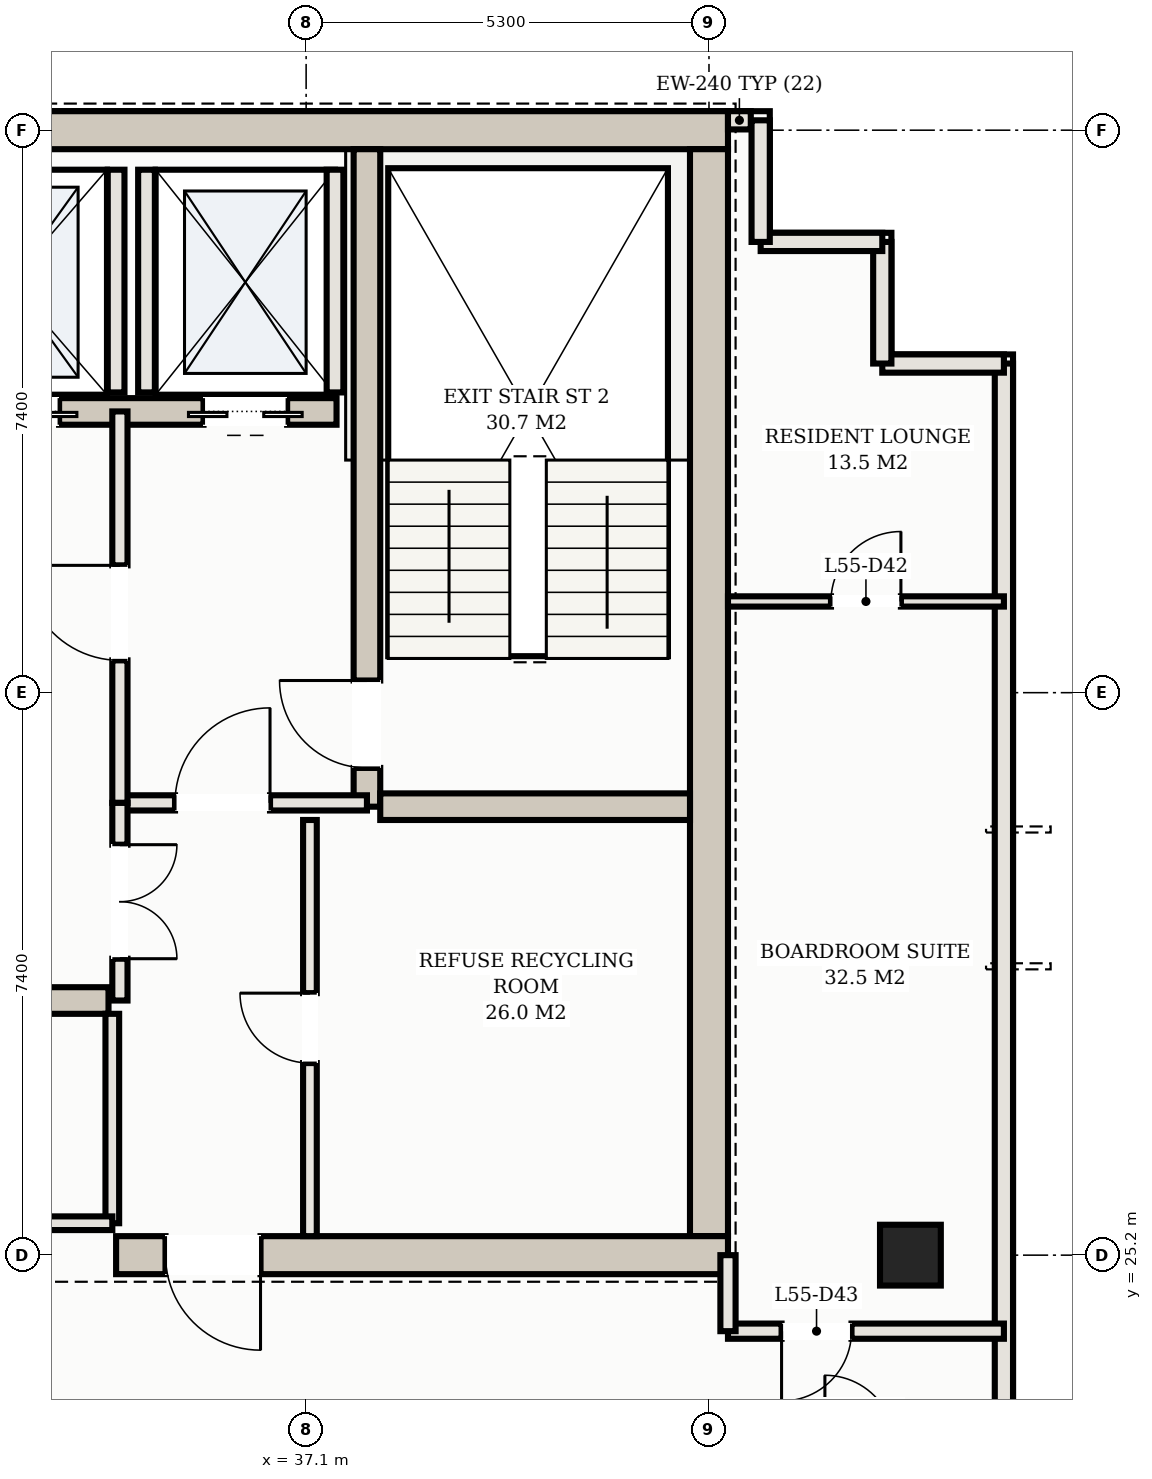
"""IFC4 building model, lengths in metres.
Left out: names, types, materials, properties, quantities, classifications, styles, units other than length and angle.
Written with IfcOpenShell. Run it as: python <this file> out.ifc"""

import sys

from ifc_helpers import new_model, si_unit, direction, frame, frame_2d, origin, origin_2d, place, context, subcontext, project, spatial, rectangle, hollow_rectangle, extrude, element, fill, save


model = new_model("IFC4")
c1 = context("Model", 3, precision=1e-05, world=origin(), true_north=direction((0.0, 1.0)))
c2 = subcontext(c1, "Body", "Model", "MODEL_VIEW")
j1 = project(units=[si_unit("LENGTHUNIT", "METRE"), si_unit("PLANEANGLEUNIT", "RADIAN")], contexts=[c1])
p1 = place(None, origin())
s1 = spatial("IfcSite", under=j1, at=p1, CompositionType="ELEMENT")
p2 = place(p1, origin())
s2 = spatial("IfcBuilding", under=s1, at=p2, CompositionType="ELEMENT")
p3 = place(p2, frame((0.0, 0.0, 203.3)))
s3 = spatial("IfcBuildingStorey", under=s2, at=p3, CompositionType="ELEMENT", Elevation=203.3)
p4 = place(p3, frame((10.35, 40.0, 0.0), z_axis=(0.0, 0.0, 1.0), x_axis=(1.0, 0.0, 0.0)))
e1 = element("IfcWall", 1, at=p4, inside=s3, PredefinedType="SHEAR", context=c2, shape_type="SweptSolid", body=[
    extrude(rectangle(XDim=32.3, YDim=0.5, at=frame_2d((16.15, 0.0))), origin(), (0.0, 0.0, 1.0), 3.11),
])
p5 = place(p3, frame((42.4, 25.45, 0.0), z_axis=(0.0, 0.0, 1.0), x_axis=(0.0, 1.0, 0.0)))
e2 = element("IfcWall", 2, at=p5, inside=s3, PredefinedType="SHEAR", context=c2, shape_type="SweptSolid", body=[
    extrude(rectangle(XDim=14.3, YDim=0.5, at=frame_2d((7.15, 0.0))), origin(), (0.0, 0.0, 1.0), 3.11),
])
p6 = place(p3, frame((34.6, 25.2, 0.0), z_axis=(0.0, 0.0, 1.0), x_axis=(1.0, 0.0, 0.0)))
e3 = element("IfcWall", 3, at=p6, inside=s3, PredefinedType="SHEAR", context=c2, shape_type="SweptSolid", body=[
    extrude(rectangle(XDim=8.05, YDim=0.5, at=frame_2d((4.025, 0.0))), origin(), (0.0, 0.0, 1.0), 3.11),
])
p7 = place(p6, frame((0.65, 0.0, 0.0)))
e4 = element("IfcOpeningElement", 4, at=p7, cuts=e3, PredefinedType="OPENING", context=c2, shape_type="SweptSolid", body=[
    extrude(rectangle(XDim=1.25, YDim=2.2, at=frame_2d((0.625, 1.1))), frame((0.0, 0.26, 0.0), z_axis=(0.0, -1.0, 0.0), x_axis=(1.0, 0.0, 0.0)), (0.0, 0.0, 1.0), 0.52),
])
p8 = place(p3, frame((37.9, 31.1, 0.0), z_axis=(0.0, 0.0, 1.0), x_axis=(0.0, 1.0, 0.0)))
e5 = element("IfcWall", 5, at=p8, inside=s3, PredefinedType="SHEAR", context=c2, shape_type="SweptSolid", body=[
    extrude(rectangle(XDim=8.65, YDim=0.35, at=frame_2d((4.325, 0.0))), origin(), (0.0, 0.0, 1.0), 3.11),
])
p9 = place(p8, frame((0.51, 0.0, 0.0)))
e6 = element("IfcOpeningElement", 6, at=p9, cuts=e5, PredefinedType="OPENING", context=c2, shape_type="SweptSolid", body=[
    extrude(rectangle(XDim=1.15, YDim=2.2, at=frame_2d((0.575, 1.1))), frame((0.0, 0.185, 0.0), z_axis=(0.0, -1.0, 0.0), x_axis=(1.0, 0.0, 0.0)), (0.0, 0.0, 1.0), 0.37),
])
p10 = place(p3, frame((38.075, 31.1, 0.0), z_axis=(0.0, 0.0, 1.0), x_axis=(1.0, 0.0, 0.0)))
e7 = element("IfcWall", 7, at=p10, inside=s3, PredefinedType="SHEAR", context=c2, shape_type="SweptSolid", body=[
    extrude(rectangle(XDim=4.075, YDim=0.35, at=frame_2d((2.038, 0.0))), origin(), (0.0, 0.0, 1.0), 3.11),
])
p11 = place(p3, frame((15.5, 36.3, 0.0), z_axis=(0.0, 0.0, 1.0), x_axis=(1.0, 0.0, 0.0)))
e8 = element("IfcWall", 8, at=p11, inside=s3, PredefinedType="SHEAR", context=c2, shape_type="SweptSolid", body=[
    extrude(rectangle(XDim=22.0, YDim=0.35, at=frame_2d((11.0, 0.0))), origin(), (0.0, 0.0, 1.0), 3.11),
])
p12 = place(p11, frame((0.65, 0.0, 0.0)))
e9 = element("IfcOpeningElement", 9, at=p12, cuts=e8, PredefinedType="OPENING", context=c2, shape_type="SweptSolid", body=[
    extrude(rectangle(XDim=1.1, YDim=2.15, at=frame_2d((0.55, 1.075))), frame((0.0, 0.185, 0.0), z_axis=(0.0, -1.0, 0.0), x_axis=(1.0, 0.0, 0.0)), (0.0, 0.0, 1.0), 0.37),
])
p13 = place(p11, frame((20.25, 0.0, 0.0)))
e10 = element("IfcOpeningElement", 10, at=p13, cuts=e8, PredefinedType="OPENING", context=c2, shape_type="SweptSolid", body=[
    extrude(rectangle(XDim=1.1, YDim=2.15, at=frame_2d((0.55, 1.075))), frame((0.0, 0.185, 0.0), z_axis=(0.0, -1.0, 0.0), x_axis=(1.0, 0.0, 0.0)), (0.0, 0.0, 1.0), 0.37),
])
p14 = place(p11, frame((17.05, 0.0, 0.0)))
e11 = element("IfcOpeningElement", 11, at=p14, cuts=e8, PredefinedType="OPENING", context=c2, shape_type="SweptSolid", body=[
    extrude(rectangle(XDim=1.3, YDim=2.2, at=frame_2d((0.65, 1.1))), frame((0.0, 0.185, 0.0), z_axis=(0.0, -1.0, 0.0), x_axis=(1.0, 0.0, 0.0)), (0.0, 0.0, 1.0), 0.37),
])
p15 = place(p11, frame((3.95, 0.0, 0.0)))
e12 = element("IfcOpeningElement", 12, at=p15, cuts=e8, PredefinedType="OPENING", context=c2, shape_type="SweptSolid", body=[
    extrude(rectangle(XDim=1.1, YDim=2.15, at=frame_2d((0.55, 1.075))), frame((0.0, 0.185, 0.0), z_axis=(0.0, -1.0, 0.0), x_axis=(1.0, 0.0, 0.0)), (0.0, 0.0, 1.0), 0.37),
])
p16 = place(p11, frame((6.55, 0.0, 0.0)))
e13 = element("IfcOpeningElement", 13, at=p16, cuts=e8, PredefinedType="OPENING", context=c2, shape_type="SweptSolid", body=[
    extrude(rectangle(XDim=1.1, YDim=2.15, at=frame_2d((0.55, 1.075))), frame((0.0, 0.185, 0.0), z_axis=(0.0, -1.0, 0.0), x_axis=(1.0, 0.0, 0.0)), (0.0, 0.0, 1.0), 0.37),
])
p17 = place(p11, frame((9.15, 0.0, 0.0)))
e14 = element("IfcOpeningElement", 14, at=p17, cuts=e8, PredefinedType="OPENING", context=c2, shape_type="SweptSolid", body=[
    extrude(rectangle(XDim=1.1, YDim=2.15, at=frame_2d((0.55, 1.075))), frame((0.0, 0.185, 0.0), z_axis=(0.0, -1.0, 0.0), x_axis=(1.0, 0.0, 0.0)), (0.0, 0.0, 1.0), 0.37),
])
p18 = place(p3, frame((18.5, 28.55, 0.0), z_axis=(0.0, 0.0, 1.0), x_axis=(1.0, 0.0, 0.0)))
e15 = element("IfcWall", 15, at=p18, inside=s3, PredefinedType="SHEAR", context=c2, shape_type="SweptSolid", body=[
    extrude(rectangle(XDim=16.0, YDim=0.35, at=frame_2d((8.0, 0.0))), origin(), (0.0, 0.0, 1.0), 3.11),
])
p19 = place(p3, frame((45.05, 25.2, 0.0), z_axis=(0.0, 0.0, 1.0), x_axis=(1.0, 0.0, 0.0)))
e16 = element("IfcColumn", 16, at=p19, inside=s3, PredefinedType="COLUMN", context=c2, shape_type="SweptSolid", body=[
    extrude(hollow_rectangle(XDim=0.8, YDim=0.8, WallThickness=0.028, at=origin_2d()), origin(), (0.0, 0.0, 1.0), 3.3),
])
for number, where, z_axis, x_axis in (
    (17, (35.0, 36.55, 0.0), (0.0, 0.0, 1.0), (0.0, 1.0, 0.0)),
    (18, (37.48, 36.55, 0.0), (0.0, 0.0, 1.0), (0.0, 1.0, 0.0)),
    (19, (34.6, 36.55, 0.0), (0.0, 0.0, 1.0), (0.0, 1.0, 0.0)),
):
    element("IfcWall", number, at=place(p3, frame(where, z_axis=z_axis, x_axis=x_axis)), inside=s3, PredefinedType="SOLIDWALL", context=c2, shape_type="SweptSolid", body=[
        extrude(rectangle(XDim=2.93, YDim=0.22, at=frame_2d((1.465, 0.0))), origin(), (0.0, 0.0, 1.0), 3.11),
    ])
p20 = place(p3, frame((46.28, 10.52, 0.0), z_axis=(0.0, 0.0, 1.0), x_axis=(0.0, 1.0, 0.0)))
e20 = element("IfcWall", 20, at=p20, inside=s3, PredefinedType="SOLIDWALL", context=c2, shape_type="SweptSolid", body=[
    extrude(rectangle(XDim=26.41, YDim=0.24, at=frame_2d((13.205, 0.0))), origin(), (0.0, 0.0, 1.0), 3.11),
])
p21 = place(p20, frame((6.48, 0.0, 0.0)))
e21 = element("IfcOpeningElement", 21, at=p21, cuts=e20, PredefinedType="OPENING", context=c2, shape_type="SweptSolid", body=[
    extrude(rectangle(XDim=1.8, YDim=2.2, at=frame_2d((0.9, 1.1))), frame((0.0, 0.13, 0.0), z_axis=(0.0, -1.0, 0.0), x_axis=(1.0, 0.0, 0.0)), (0.0, 0.0, 1.0), 0.26),
])
for number, where, z_axis, x_axis in (
    (22, (46.28, 36.93, 0.0), (0.0, 0.0, 1.0), (-1.0, 0.0, 0.0)),
    (23, (44.68, 36.93, 0.0), (0.0, 0.0, 1.0), (0.0, 1.0, 0.0)),
):
    element("IfcWall", number, at=place(p3, frame(where, z_axis=z_axis, x_axis=x_axis)), inside=s3, PredefinedType="SOLIDWALL", context=c2, shape_type="SweptSolid", body=[
        extrude(rectangle(XDim=1.6, YDim=0.24, at=frame_2d((0.8, 0.0))), origin(), (0.0, 0.0, 1.0), 3.11),
    ])
for number, where, z_axis, x_axis in (
    (24, (44.68, 38.53, 0.0), (0.0, 0.0, 1.0), (-1.0, 0.0, 0.0)),
    (25, (43.08, 38.53, 0.0), (0.0, 0.0, 1.0), (0.0, 1.0, 0.0)),
):
    element("IfcWall", number, at=place(p3, frame(where, z_axis=z_axis, x_axis=x_axis)), inside=s3, PredefinedType="SOLIDWALL", context=c2, shape_type="SweptSolid", body=[
        extrude(rectangle(XDim=1.6, YDim=0.24, at=frame_2d((0.8, 0.0))), origin(), (0.0, 0.0, 1.0), 3.11),
    ])
p22 = place(p3, frame((42.95, 40.13, 0.0), z_axis=(0.0, 0.0, 1.0), x_axis=(-1.0, 0.0, 0.0)))
e26 = element("IfcWall", 26, at=p22, inside=s3, PredefinedType="SOLIDWALL", context=c2, shape_type="SweptSolid", body=[
    extrude(rectangle(XDim=0.3, YDim=0.24, at=frame_2d((0.15, 0.0))), origin(), (0.0, 0.0, 1.0), 3.11),
])
p23 = place(p3, frame((34.65, 31.15, 0.0), z_axis=(0.0, 0.0, 1.0), x_axis=(1.0, 0.0, 0.0)))
e27 = element("IfcWall", 27, at=p23, inside=s3, PredefinedType="PARTITIONING", context=c2, shape_type="SweptSolid", body=[
    extrude(rectangle(XDim=3.25, YDim=0.2, at=frame_2d((1.625, 0.0))), origin(), (0.0, 0.0, 1.0), 2.43),
])
p24 = place(p23, frame((0.725, 0.0, 0.0)))
e28 = element("IfcOpeningElement", 28, at=p24, cuts=e27, PredefinedType="OPENING", context=c2, shape_type="SweptSolid", body=[
    extrude(rectangle(XDim=1.25, YDim=2.2, at=frame_2d((0.625, 1.1))), frame((0.0, 0.11, 0.0), z_axis=(0.0, -1.0, 0.0), x_axis=(1.0, 0.0, 0.0)), (0.0, 0.0, 1.0), 0.22),
])
p25 = place(p3, frame((34.65, 31.15, 0.0), z_axis=(0.0, 0.0, 1.0), x_axis=(0.0, 1.0, 0.0)))
e29 = element("IfcWall", 29, at=p25, inside=s3, PredefinedType="PARTITIONING", context=c2, shape_type="SweptSolid", body=[
    extrude(rectangle(XDim=5.15, YDim=0.2, at=frame_2d((2.575, 0.0))), origin(), (0.0, 0.0, 1.0), 2.43),
])
p26 = place(p25, frame((1.875, 0.0, 0.0)))
e30 = element("IfcOpeningElement", 30, at=p26, cuts=e29, PredefinedType="OPENING", context=c2, shape_type="SweptSolid", body=[
    extrude(rectangle(XDim=1.25, YDim=2.2, at=frame_2d((0.625, 1.1))), frame((0.0, 0.11, 0.0), z_axis=(0.0, -1.0, 0.0), x_axis=(1.0, 0.0, 0.0)), (0.0, 0.0, 1.0), 0.22),
])
p27 = place(p3, frame((37.15, 25.45, 0.0), z_axis=(0.0, 0.0, 1.0), x_axis=(0.0, 1.0, 0.0)))
e31 = element("IfcWall", 31, at=p27, inside=s3, PredefinedType="PARTITIONING", context=c2, shape_type="SweptSolid", body=[
    extrude(rectangle(XDim=5.475, YDim=0.18, at=frame_2d((2.738, 0.0))), origin(), (0.0, 0.0, 1.0), 2.43),
])
p28 = place(p27, frame((2.277, 0.0, 0.0)))
e32 = element("IfcOpeningElement", 32, at=p28, cuts=e31, PredefinedType="OPENING", context=c2, shape_type="SweptSolid", body=[
    extrude(rectangle(XDim=0.92, YDim=2.15, at=frame_2d((0.46, 1.075))), frame((0.0, 0.1, 0.0), z_axis=(0.0, -1.0, 0.0), x_axis=(1.0, 0.0, 0.0)), (0.0, 0.0, 1.0), 0.2),
])
p29 = place(p3, frame((34.65, 28.55, 0.0), z_axis=(0.0, 0.0, 1.0), x_axis=(0.0, 1.0, 0.0)))
e33 = element("IfcWall", 33, at=p29, inside=s3, PredefinedType="PARTITIONING", context=c2, shape_type="SweptSolid", body=[
    extrude(rectangle(XDim=2.6, YDim=0.2, at=frame_2d((1.3, 0.0))), origin(), (0.0, 0.0, 1.0), 2.43),
])
p30 = place(p29, frame((0.55, 0.0, 0.0)))
e34 = element("IfcOpeningElement", 34, at=p30, cuts=e33, PredefinedType="OPENING", context=c2, shape_type="SweptSolid", body=[
    extrude(rectangle(XDim=1.5, YDim=2.25, at=frame_2d((0.75, 1.125))), frame((0.0, 0.11, 0.0), z_axis=(0.0, -1.0, 0.0), x_axis=(1.0, 0.0, 0.0)), (0.0, 0.0, 1.0), 0.22),
])
p31 = place(p3, frame((34.55, 25.62, 0.0), z_axis=(0.0, 0.0, 1.0), x_axis=(0.0, 1.0, 0.0)))
e35 = element("IfcWall", 35, at=p31, inside=s3, PredefinedType="PARTITIONING", context=c2, shape_type="SweptSolid", body=[
    extrude(rectangle(XDim=2.755, YDim=0.18, at=frame_2d((1.377, 0.0))), origin(), (0.0, 0.0, 1.0), 2.43),
])
p32 = place(p3, frame((26.65, 25.62, 0.0), z_axis=(0.0, 0.0, 1.0), x_axis=(1.0, 0.0, 0.0)))
e36 = element("IfcWall", 36, at=p32, inside=s3, PredefinedType="PARTITIONING", context=c2, shape_type="SweptSolid", body=[
    extrude(rectangle(XDim=7.9, YDim=0.18, at=frame_2d((3.95, 0.0))), origin(), (0.0, 0.0, 1.0), 2.43),
])
p33 = place(p32, frame((3.34, 0.0, 0.0)))
e37 = element("IfcOpeningElement", 37, at=p33, cuts=e36, PredefinedType="OPENING", context=c2, shape_type="SweptSolid", body=[
    extrude(rectangle(XDim=0.92, YDim=2.15, at=frame_2d((0.46, 1.075))), frame((0.0, 0.1, 0.0), z_axis=(0.0, -1.0, 0.0), x_axis=(1.0, 0.0, 0.0)), (0.0, 0.0, 1.0), 0.2),
])
p34 = place(p3, frame((42.65, 24.2, 0.0), z_axis=(0.0, 0.0, 1.0), x_axis=(1.0, 0.0, 0.0)))
e38 = element("IfcWall", 38, at=p34, inside=s3, PredefinedType="PARTITIONING", context=c2, shape_type="SweptSolid", body=[
    extrude(rectangle(XDim=3.63, YDim=0.2, at=frame_2d((1.815, 0.0))), origin(), (0.0, 0.0, 1.0), 2.43),
])
p35 = place(p34, frame((0.705, 0.0, 0.0)))
e39 = element("IfcOpeningElement", 39, at=p35, cuts=e38, PredefinedType="OPENING", context=c2, shape_type="SweptSolid", body=[
    extrude(rectangle(XDim=0.92, YDim=2.15, at=frame_2d((0.46, 1.075))), frame((0.0, 0.11, 0.0), z_axis=(0.0, -1.0, 0.0), x_axis=(1.0, 0.0, 0.0)), (0.0, 0.0, 1.0), 0.22),
])
p36 = place(p3, frame((42.65, 24.2, 0.0), z_axis=(0.0, 0.0, 1.0), x_axis=(0.0, 1.0, 0.0)))
e40 = element("IfcWall", 40, at=p36, inside=s3, PredefinedType="PARTITIONING", context=c2, shape_type="SweptSolid", body=[
    extrude(rectangle(XDim=1.0, YDim=0.2, at=frame_2d((0.5, 0.0))), origin(), (0.0, 0.0, 1.0), 2.43),
])
p37 = place(p3, frame((42.65, 33.8, 0.0), z_axis=(0.0, 0.0, 1.0), x_axis=(1.0, 0.0, 0.0)))
e41 = element("IfcWall", 41, at=p37, inside=s3, PredefinedType="PARTITIONING", context=c2, shape_type="SweptSolid", body=[
    extrude(rectangle(XDim=3.63, YDim=0.135, at=frame_2d((1.815, 0.0))), origin(), (0.0, 0.0, 1.0), 2.43),
])
p38 = place(p37, frame((1.355, 0.0, 0.0)))
e42 = element("IfcOpeningElement", 42, at=p38, cuts=e41, PredefinedType="OPENING", context=c2, shape_type="SweptSolid", body=[
    extrude(rectangle(XDim=0.92, YDim=2.15, at=frame_2d((0.46, 1.075))), frame((0.0, 0.078, 0.0), z_axis=(0.0, -1.0, 0.0), x_axis=(1.0, 0.0, 0.0)), (0.0, 0.0, 1.0), 0.155),
])
p39 = place(p13, frame((1.1, 0.0, 0.0), z_axis=(0.0, 0.0, 1.0), x_axis=(-1.0, 0.0, 0.0)))
e43 = element("IfcDoor", 43, at=p39, inside=s3, OperationType="DOUBLE_DOOR_SLIDING", PredefinedType="DOOR", context=c2, shape_type="SweptSolid", body=[
    extrude(rectangle(XDim=1.1, YDim=2.15, at=frame_2d((0.55, 1.075))), frame((0.0, 0.025, 0.0), z_axis=(0.0, -1.0, 0.0), x_axis=(1.0, 0.0, 0.0)), (0.0, 0.0, 1.0), 0.05),
])
fill(e10, e43)
p40 = place(p14, frame((1.3, 0.0, 0.0), z_axis=(0.0, 0.0, 1.0), x_axis=(-1.0, 0.0, 0.0)))
e44 = element("IfcDoor", 44, at=p40, inside=s3, OperationType="DOUBLE_DOOR_SLIDING", PredefinedType="DOOR", context=c2, shape_type="SweptSolid", body=[
    extrude(rectangle(XDim=1.3, YDim=2.2, at=frame_2d((0.65, 1.1))), frame((0.0, 0.025, 0.0), z_axis=(0.0, -1.0, 0.0), x_axis=(1.0, 0.0, 0.0)), (0.0, 0.0, 1.0), 0.05),
])
fill(e11, e44)
p41 = place(p7, frame((1.25, 0.0, 0.0), z_axis=(0.0, 0.0, 1.0), x_axis=(-1.0, 0.0, 0.0)))
e45 = element("IfcDoor", 45, at=p41, inside=s3, OperationType="SINGLE_SWING_LEFT", PredefinedType="DOOR", context=c2, shape_type="SweptSolid", body=[
    extrude(rectangle(XDim=1.25, YDim=2.2, at=frame_2d((0.625, 1.1))), frame((0.0, 0.025, 0.0), z_axis=(0.0, -1.0, 0.0), x_axis=(1.0, 0.0, 0.0)), (0.0, 0.0, 1.0), 0.05),
])
fill(e4, e45)
p42 = place(p24, origin())
e46 = element("IfcDoor", 46, at=p42, inside=s3, OperationType="SINGLE_SWING_RIGHT", PredefinedType="DOOR", context=c2, shape_type="SweptSolid", body=[
    extrude(rectangle(XDim=1.25, YDim=2.2, at=frame_2d((0.625, 1.1))), frame((0.0, 0.025, 0.0), z_axis=(0.0, -1.0, 0.0), x_axis=(1.0, 0.0, 0.0)), (0.0, 0.0, 1.0), 0.05),
])
fill(e28, e46)
p43 = place(p26, origin())
e47 = element("IfcDoor", 47, at=p43, inside=s3, OperationType="SINGLE_SWING_RIGHT", PredefinedType="DOOR", context=c2, shape_type="SweptSolid", body=[
    extrude(rectangle(XDim=1.25, YDim=2.2, at=frame_2d((0.625, 1.1))), frame((0.0, 0.025, 0.0), z_axis=(0.0, -1.0, 0.0), x_axis=(1.0, 0.0, 0.0)), (0.0, 0.0, 1.0), 0.05),
])
fill(e30, e47)
p44 = place(p9, origin())
e48 = element("IfcDoor", 48, at=p44, inside=s3, OperationType="SINGLE_SWING_RIGHT", PredefinedType="DOOR", context=c2, shape_type="SweptSolid", body=[
    extrude(rectangle(XDim=1.15, YDim=2.2, at=frame_2d((0.575, 1.1))), frame((0.0, 0.025, 0.0), z_axis=(0.0, -1.0, 0.0), x_axis=(1.0, 0.0, 0.0)), (0.0, 0.0, 1.0), 0.05),
])
fill(e6, e48)
p45 = place(p28, origin())
e49 = element("IfcDoor", 49, at=p45, inside=s3, OperationType="SINGLE_SWING_RIGHT", PredefinedType="DOOR", context=c2, shape_type="SweptSolid", body=[
    extrude(rectangle(XDim=0.92, YDim=2.15, at=frame_2d((0.46, 1.075))), frame((0.0, 0.025, 0.0), z_axis=(0.0, -1.0, 0.0), x_axis=(1.0, 0.0, 0.0)), (0.0, 0.0, 1.0), 0.05),
])
fill(e32, e49)
p46 = place(p30, frame((1.5, 0.0, 0.0), z_axis=(0.0, 0.0, 1.0), x_axis=(-1.0, 0.0, 0.0)))
e50 = element("IfcDoor", 50, at=p46, inside=s3, OperationType="DOUBLE_DOOR_SINGLE_SWING", PredefinedType="DOOR", context=c2, shape_type="SweptSolid", body=[
    extrude(rectangle(XDim=1.5, YDim=2.25, at=frame_2d((0.75, 1.125))), frame((0.0, 0.025, 0.0), z_axis=(0.0, -1.0, 0.0), x_axis=(1.0, 0.0, 0.0)), (0.0, 0.0, 1.0), 0.05),
])
fill(e34, e50)
p47 = place(p38, origin())
e51 = element("IfcDoor", 51, at=p47, inside=s3, OperationType="SINGLE_SWING_RIGHT", PredefinedType="DOOR", context=c2, shape_type="SweptSolid", body=[
    extrude(rectangle(XDim=0.92, YDim=2.15, at=frame_2d((0.46, 1.075))), frame((0.0, 0.025, 0.0), z_axis=(0.0, -1.0, 0.0), x_axis=(1.0, 0.0, 0.0)), (0.0, 0.0, 1.0), 0.05),
])
fill(e42, e51)
p48 = place(p35, frame((0.92, 0.0, 0.0), z_axis=(0.0, 0.0, 1.0), x_axis=(-1.0, 0.0, 0.0)))
e52 = element("IfcDoor", 52, at=p48, inside=s3, OperationType="SINGLE_SWING_RIGHT", PredefinedType="DOOR", context=c2, shape_type="SweptSolid", body=[
    extrude(rectangle(XDim=0.92, YDim=2.15, at=frame_2d((0.46, 1.075))), frame((0.0, 0.025, 0.0), z_axis=(0.0, -1.0, 0.0), x_axis=(1.0, 0.0, 0.0)), (0.0, 0.0, 1.0), 0.05),
])
fill(e39, e52)
save(model, sys.argv[1])
